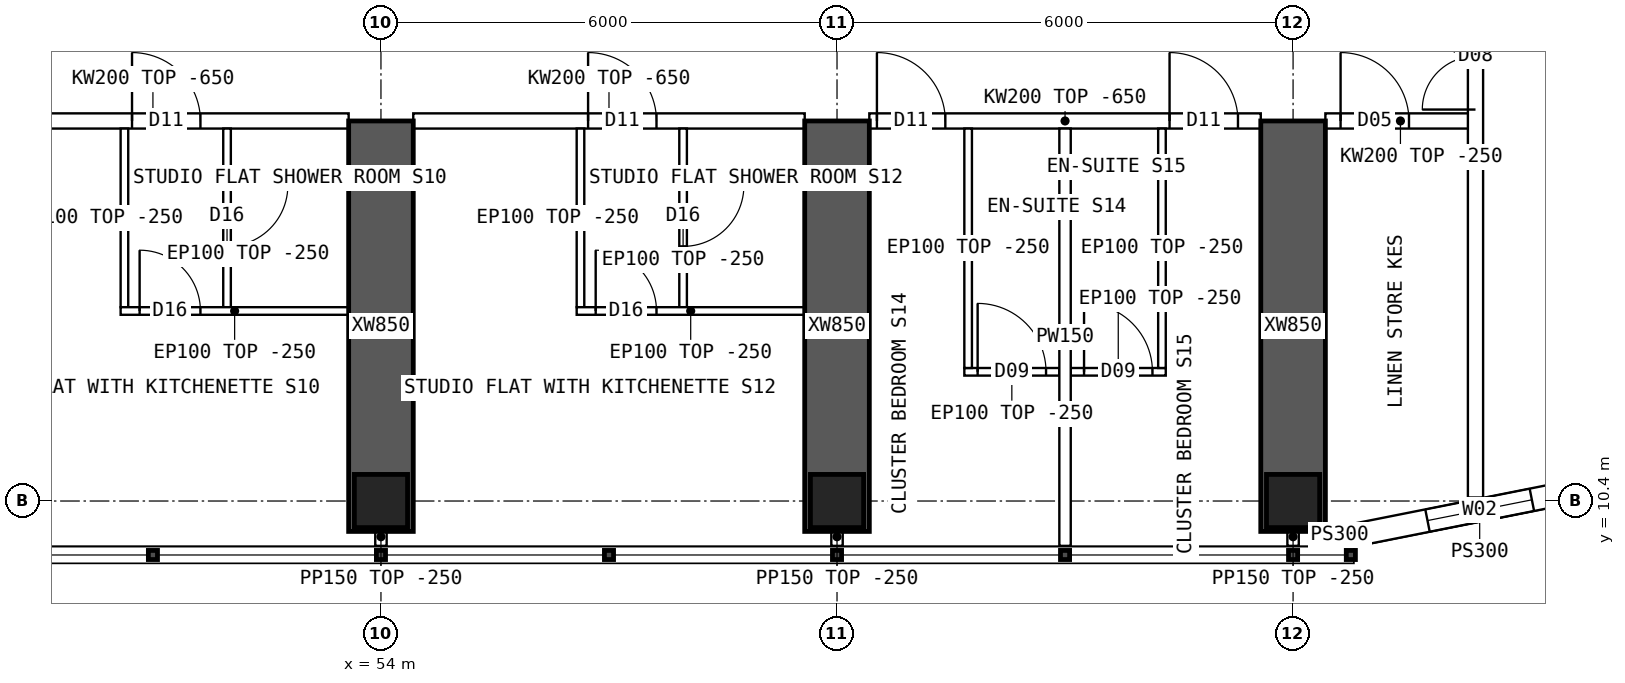
"""IFC4 building model, lengths in metres.
Left out: names, types, materials, properties, quantities, classifications, styles, units other than length and angle.
Written with IfcOpenShell. Run it as: python <this file> out.ifc"""

import sys

from ifc_helpers import new_model, si_unit, direction, frame, frame_2d, origin, origin_2d, place, context, subcontext, project, spatial, polyline, rectangle, hollow_rectangle, outline, extrude, element, fill, save


model = new_model("IFC4")
c1 = context("Model", 3, precision=1e-05, world=origin(), true_north=direction((0.0, 1.0)))
c2 = subcontext(c1, "Body", "Model", "MODEL_VIEW")
j1 = project(units=[si_unit("LENGTHUNIT", "METRE"), si_unit("PLANEANGLEUNIT", "RADIAN")], contexts=[c1])
p1 = place(None, origin())
s1 = spatial("IfcSite", under=j1, at=p1, CompositionType="ELEMENT")
p2 = place(p1, origin())
s2 = spatial("IfcBuilding", under=s1, at=p2, CompositionType="ELEMENT")
p3 = place(p2, frame((0.0, 0.0, 182.35)))
s3 = spatial("IfcBuildingStorey", under=s2, at=p3, CompositionType="ELEMENT", Elevation=182.35)
for number, where, z_axis, x_axis in (
    (1, (54.0, 10.4, 0.0), (0.0, 0.0, 1.0), (1.0, 0.0, 0.0)),
    (2, (60.0, 10.4, 0.0), (0.0, 0.0, 1.0), (1.0, 0.0, 0.0)),
    (3, (66.0, 10.4, 0.0), (0.0, 0.0, 1.0), (1.0, 0.0, 0.0)),
):
    element("IfcColumn", number, at=place(p3, frame(where, z_axis=z_axis, x_axis=x_axis)), inside=s3, PredefinedType="COLUMN", context=c2, shape_type="SweptSolid", body=[
        extrude(hollow_rectangle(XDim=0.7, YDim=0.7, WallThickness=0.07, at=origin_2d()), origin(), (0.0, 0.0, 1.0), 3.75),
    ])
for number, where, z_axis, x_axis in (
    (4, (54.0, 10.0, 0.0), (0.0, 0.0, 1.0), (0.0, 1.0, 0.0)),
    (5, (60.0, 10.0, 0.0), (0.0, 0.0, 1.0), (0.0, 1.0, 0.0)),
    (6, (66.0, 10.0, 0.0), (0.0, 0.0, 1.0), (0.0, 1.0, 0.0)),
):
    element("IfcWall", number, at=place(p3, frame(where, z_axis=z_axis, x_axis=x_axis)), inside=s3, PredefinedType="SHEAR", context=c2, shape_type="SweptSolid", body=[
        extrude(rectangle(XDim=5.4, YDim=0.85, at=frame_2d((2.7, 0.0))), origin(), (0.0, 0.0, 1.0), 3.75),
    ])
p4 = place(p3, frame((66.8, 9.95, 0.0), z_axis=(0.0, 0.0, 1.0), x_axis=(0.98078325777, 0.195100490205, 0.0)))
e7 = element("IfcWall", 7, at=p4, inside=s3, PredefinedType="SOLIDWALL", context=c2, shape_type="SweptSolid", body=[
    extrude(outline(polyline([(-0.03, -0.15), (3.405, -0.15), (3.345, 0.15), (0.03, 0.15), (-0.03, -0.15)])), origin(), (0.0, 0.0, 1.0), 3.5),
])
p5 = place(p4, frame((0.988, 0.0, 0.9)))
e8 = element("IfcOpeningElement", 8, at=p5, cuts=e7, PredefinedType="OPENING", context=c2, shape_type="SweptSolid", body=[
    extrude(rectangle(XDim=1.4, YDim=1.8, at=frame_2d((0.7, 0.9))), frame((0.0, 0.16, 0.0), z_axis=(0.0, -1.0, 0.0), x_axis=(1.0, 0.0, 0.0)), (0.0, 0.0, 1.0), 0.32),
])
p6 = place(p3, frame((66.8, 9.95, 0.0), z_axis=(0.0, 0.0, 1.0), x_axis=(-1.0, 0.0, 0.0)))
e9 = element("IfcWall", 9, at=p6, inside=s3, PredefinedType="SOLIDWALL", context=c2, shape_type="SweptSolid", body=[
    extrude(rectangle(XDim=0.375, YDim=0.3, at=frame_2d((0.188, 0.0))), origin(), (0.0, 0.0, 1.0), 3.5),
])
p7 = place(p3, frame((48.425, 15.4, 0.0), z_axis=(0.0, 0.0, 1.0), x_axis=(1.0, 0.0, 0.0)))
e10 = element("IfcWall", 10, at=p7, inside=s3, PredefinedType="SOLIDWALL", context=c2, shape_type="SweptSolid", body=[
    extrude(outline(polyline([(0.0, 0.0), (5.15, 0.0), (5.15, 3.1), (0.0, 3.1), (0.0, 0.0)])), frame((0.0, 0.1, 0.0), z_axis=(0.0, -1.0, 0.0), x_axis=(1.0, 0.0, 0.0)), (0.0, 0.0, 1.0), 0.2),
])
p8 = place(p7, frame((2.3, 0.0, 0.0)))
e11 = element("IfcOpeningElement", 11, at=p8, cuts=e10, PredefinedType="OPENING", context=c2, shape_type="SweptSolid", body=[
    extrude(rectangle(XDim=0.9, YDim=2.1, at=frame_2d((0.45, 1.05))), frame((0.0, 0.11, 0.0), z_axis=(0.0, -1.0, 0.0), x_axis=(1.0, 0.0, 0.0)), (0.0, 0.0, 1.0), 0.22),
])
p9 = place(p3, frame((54.425, 15.4, 0.0), z_axis=(0.0, 0.0, 1.0), x_axis=(1.0, 0.0, 0.0)))
e12 = element("IfcWall", 12, at=p9, inside=s3, PredefinedType="SOLIDWALL", context=c2, shape_type="SweptSolid", body=[
    extrude(outline(polyline([(0.0, 0.0), (5.15, 0.0), (5.15, 3.1), (0.0, 3.1), (0.0, 0.0)])), frame((0.0, 0.1, 0.0), z_axis=(0.0, -1.0, 0.0), x_axis=(1.0, 0.0, 0.0)), (0.0, 0.0, 1.0), 0.2),
])
p10 = place(p9, frame((2.3, 0.0, 0.0)))
e13 = element("IfcOpeningElement", 13, at=p10, cuts=e12, PredefinedType="OPENING", context=c2, shape_type="SweptSolid", body=[
    extrude(rectangle(XDim=0.9, YDim=2.1, at=frame_2d((0.45, 1.05))), frame((0.0, 0.11, 0.0), z_axis=(0.0, -1.0, 0.0), x_axis=(1.0, 0.0, 0.0)), (0.0, 0.0, 1.0), 0.22),
])
p11 = place(p3, frame((60.425, 15.4, 0.0), z_axis=(0.0, 0.0, 1.0), x_axis=(1.0, 0.0, 0.0)))
e14 = element("IfcWall", 14, at=p11, inside=s3, PredefinedType="SOLIDWALL", context=c2, shape_type="SweptSolid", body=[
    extrude(outline(polyline([(0.0, 0.0), (5.15, 0.0), (5.15, 3.1), (0.0, 3.1), (0.0, 0.0)])), frame((0.0, 0.1, 0.0), z_axis=(0.0, -1.0, 0.0), x_axis=(1.0, 0.0, 0.0)), (0.0, 0.0, 1.0), 0.2),
])
p12 = place(p11, frame((0.1, 0.0, 0.0)))
e15 = element("IfcOpeningElement", 15, at=p12, cuts=e14, PredefinedType="OPENING", context=c2, shape_type="SweptSolid", body=[
    extrude(rectangle(XDim=0.9, YDim=2.1, at=frame_2d((0.45, 1.05))), frame((0.0, 0.11, 0.0), z_axis=(0.0, -1.0, 0.0), x_axis=(1.0, 0.0, 0.0)), (0.0, 0.0, 1.0), 0.22),
])
p13 = place(p11, frame((3.95, 0.0, 0.0)))
e16 = element("IfcOpeningElement", 16, at=p13, cuts=e14, PredefinedType="OPENING", context=c2, shape_type="SweptSolid", body=[
    extrude(rectangle(XDim=0.9, YDim=2.1, at=frame_2d((0.45, 1.05))), frame((0.0, 0.11, 0.0), z_axis=(0.0, -1.0, 0.0), x_axis=(1.0, 0.0, 0.0)), (0.0, 0.0, 1.0), 0.22),
])
p14 = place(p3, frame((66.425, 15.4, 0.0), z_axis=(0.0, 0.0, 1.0), x_axis=(1.0, 0.0, 0.0)))
e17 = element("IfcWall", 17, at=p14, inside=s3, PredefinedType="SOLIDWALL", context=c2, shape_type="SweptSolid", body=[
    extrude(rectangle(XDim=1.975, YDim=0.2, at=frame_2d((0.987, 0.0))), origin(), (0.0, 0.0, 1.0), 3.5),
])
p15 = place(p14, frame((0.2, 0.0, 0.0)))
e18 = element("IfcOpeningElement", 18, at=p15, cuts=e17, PredefinedType="OPENING", context=c2, shape_type="SweptSolid", body=[
    extrude(rectangle(XDim=0.9, YDim=2.1, at=frame_2d((0.45, 1.05))), frame((0.0, 0.11, 0.0), z_axis=(0.0, -1.0, 0.0), x_axis=(1.0, 0.0, 0.0)), (0.0, 0.0, 1.0), 0.22),
])
p16 = place(p3, frame((53.575, 12.9, 0.0), z_axis=(0.0, 0.0, 1.0), x_axis=(-1.0, 0.0, 0.0)))
e19 = element("IfcWall", 19, at=p16, inside=s3, PredefinedType="PARTITIONING", context=c2, shape_type="SweptSolid", body=[
    extrude(rectangle(XDim=3.0, YDim=0.1, at=frame_2d((1.5, 0.0))), origin(), (0.0, 0.0, 1.0), 3.5),
])
p17 = place(p16, frame((1.95, 0.0, 0.0)))
e20 = element("IfcOpeningElement", 20, at=p17, cuts=e19, PredefinedType="OPENING", context=c2, shape_type="SweptSolid", body=[
    extrude(rectangle(XDim=0.8, YDim=2.1, at=frame_2d((0.4, 1.05))), frame((0.0, 0.06, 0.0), z_axis=(0.0, -1.0, 0.0), x_axis=(1.0, 0.0, 0.0)), (0.0, 0.0, 1.0), 0.12),
])
p18 = place(p3, frame((50.625, 12.95, 0.0), z_axis=(0.0, 0.0, 1.0), x_axis=(0.0, 1.0, 0.0)))
e21 = element("IfcWall", 21, at=p18, inside=s3, PredefinedType="PARTITIONING", context=c2, shape_type="SweptSolid", body=[
    extrude(outline(polyline([(0.0, 0.0), (2.35, 0.0), (2.35, 3.1), (2.302, 3.1), (2.3, 3.5), (0.0, 3.5), (0.0, 0.0)])), frame((0.0, 0.05, 0.0), z_axis=(0.0, -1.0, 0.0), x_axis=(1.0, 0.0, 0.0)), (0.0, 0.0, 1.0), 0.1),
])
p19 = place(p3, frame((51.975, 12.95, 0.0), z_axis=(0.0, 0.0, 1.0), x_axis=(0.0, 1.0, 0.0)))
e22 = element("IfcWall", 22, at=p19, inside=s3, PredefinedType="PARTITIONING", context=c2, shape_type="SweptSolid", body=[
    extrude(outline(polyline([(0.0, 0.0), (2.35, 0.0), (2.35, 3.1), (2.302, 3.1), (2.3, 3.5), (0.0, 3.5), (0.0, 0.0)])), frame((0.0, 0.05, 0.0), z_axis=(0.0, -1.0, 0.0), x_axis=(1.0, 0.0, 0.0)), (0.0, 0.0, 1.0), 0.1),
])
p20 = place(p19, frame((0.8, 0.0, 0.0)))
e23 = element("IfcOpeningElement", 23, at=p20, cuts=e22, PredefinedType="OPENING", context=c2, shape_type="SweptSolid", body=[
    extrude(rectangle(XDim=0.8, YDim=2.1, at=frame_2d((0.4, 1.05))), frame((0.0, 0.06, 0.0), z_axis=(0.0, -1.0, 0.0), x_axis=(1.0, 0.0, 0.0)), (0.0, 0.0, 1.0), 0.12),
])
p21 = place(p3, frame((59.575, 12.9, 0.0), z_axis=(0.0, 0.0, 1.0), x_axis=(-1.0, 0.0, 0.0)))
e24 = element("IfcWall", 24, at=p21, inside=s3, PredefinedType="PARTITIONING", context=c2, shape_type="SweptSolid", body=[
    extrude(rectangle(XDim=3.0, YDim=0.1, at=frame_2d((1.5, 0.0))), origin(), (0.0, 0.0, 1.0), 3.5),
])
p22 = place(p21, frame((1.95, 0.0, 0.0)))
e25 = element("IfcOpeningElement", 25, at=p22, cuts=e24, PredefinedType="OPENING", context=c2, shape_type="SweptSolid", body=[
    extrude(rectangle(XDim=0.8, YDim=2.1, at=frame_2d((0.4, 1.05))), frame((0.0, 0.06, 0.0), z_axis=(0.0, -1.0, 0.0), x_axis=(1.0, 0.0, 0.0)), (0.0, 0.0, 1.0), 0.12),
])
p23 = place(p3, frame((56.625, 12.95, 0.0), z_axis=(0.0, 0.0, 1.0), x_axis=(0.0, 1.0, 0.0)))
e26 = element("IfcWall", 26, at=p23, inside=s3, PredefinedType="PARTITIONING", context=c2, shape_type="SweptSolid", body=[
    extrude(outline(polyline([(0.0, 0.0), (2.35, 0.0), (2.35, 3.1), (2.302, 3.1), (2.3, 3.5), (0.0, 3.5), (0.0, 0.0)])), frame((0.0, 0.05, 0.0), z_axis=(0.0, -1.0, 0.0), x_axis=(1.0, 0.0, 0.0)), (0.0, 0.0, 1.0), 0.1),
])
p24 = place(p3, frame((57.975, 12.95, 0.0), z_axis=(0.0, 0.0, 1.0), x_axis=(0.0, 1.0, 0.0)))
e27 = element("IfcWall", 27, at=p24, inside=s3, PredefinedType="PARTITIONING", context=c2, shape_type="SweptSolid", body=[
    extrude(outline(polyline([(0.0, 0.0), (2.35, 0.0), (2.35, 3.1), (2.302, 3.1), (2.3, 3.5), (0.0, 3.5), (0.0, 0.0)])), frame((0.0, 0.05, 0.0), z_axis=(0.0, -1.0, 0.0), x_axis=(1.0, 0.0, 0.0)), (0.0, 0.0, 1.0), 0.1),
])
p25 = place(p24, frame((0.8, 0.0, 0.0)))
e28 = element("IfcOpeningElement", 28, at=p25, cuts=e27, PredefinedType="OPENING", context=c2, shape_type="SweptSolid", body=[
    extrude(rectangle(XDim=0.8, YDim=2.1, at=frame_2d((0.4, 1.05))), frame((0.0, 0.06, 0.0), z_axis=(0.0, -1.0, 0.0), x_axis=(1.0, 0.0, 0.0)), (0.0, 0.0, 1.0), 0.12),
])
p26 = place(p3, frame((63.0, 9.81, 0.0), z_axis=(0.0, 0.0, 1.0), x_axis=(0.0, 1.0, 0.0)))
e29 = element("IfcWall", 29, at=p26, inside=s3, PredefinedType="PARTITIONING", context=c2, shape_type="SweptSolid", body=[
    extrude(outline(polyline([(0.0, 0.0), (5.49, 0.0), (5.49, 3.1), (5.442, 3.1), (5.44, 3.5), (0.792, 3.5), (0.79, 3.1), (0.392, 3.1), (0.39, 3.5), (0.0, 3.5), (0.0, 0.0)])), frame((0.0, 0.075, 0.0), z_axis=(0.0, -1.0, 0.0), x_axis=(1.0, 0.0, 0.0)), (0.0, 0.0, 1.0), 0.15),
])
p27 = place(p3, frame((62.925, 12.1, 0.0), z_axis=(0.0, 0.0, 1.0), x_axis=(-1.0, 0.0, 0.0)))
e30 = element("IfcWall", 30, at=p27, inside=s3, PredefinedType="PARTITIONING", context=c2, shape_type="SweptSolid", body=[
    extrude(rectangle(XDim=1.25, YDim=0.1, at=frame_2d((0.625, 0.0))), origin(), (0.0, 0.0, 1.0), 3.5),
])
p28 = place(p27, frame((0.175, 0.0, 0.0)))
e31 = element("IfcOpeningElement", 31, at=p28, cuts=e30, PredefinedType="OPENING", context=c2, shape_type="SweptSolid", body=[
    extrude(rectangle(XDim=0.9, YDim=2.1, at=frame_2d((0.45, 1.05))), frame((0.0, 0.06, 0.0), z_axis=(0.0, -1.0, 0.0), x_axis=(1.0, 0.0, 0.0)), (0.0, 0.0, 1.0), 0.12),
])
p29 = place(p3, frame((61.725, 12.15, 0.0), z_axis=(0.0, 0.0, 1.0), x_axis=(0.0, 1.0, 0.0)))
e32 = element("IfcWall", 32, at=p29, inside=s3, PredefinedType="PARTITIONING", context=c2, shape_type="SweptSolid", body=[
    extrude(outline(polyline([(0.0, 0.0), (3.15, 0.0), (3.15, 3.1), (3.102, 3.1), (3.1, 3.5), (0.0, 3.5), (0.0, 0.0)])), frame((0.0, 0.05, 0.0), z_axis=(0.0, -1.0, 0.0), x_axis=(1.0, 0.0, 0.0)), (0.0, 0.0, 1.0), 0.1),
])
p30 = place(p3, frame((64.325, 12.1, 0.0), z_axis=(0.0, 0.0, 1.0), x_axis=(-1.0, 0.0, 0.0)))
e33 = element("IfcWall", 33, at=p30, inside=s3, PredefinedType="PARTITIONING", context=c2, shape_type="SweptSolid", body=[
    extrude(rectangle(XDim=1.25, YDim=0.1, at=frame_2d((0.625, 0.0))), origin(), (0.0, 0.0, 1.0), 3.5),
])
p31 = place(p30, frame((0.175, 0.0, 0.0)))
e34 = element("IfcOpeningElement", 34, at=p31, cuts=e33, PredefinedType="OPENING", context=c2, shape_type="SweptSolid", body=[
    extrude(rectangle(XDim=0.9, YDim=2.1, at=frame_2d((0.45, 1.05))), frame((0.0, 0.06, 0.0), z_axis=(0.0, -1.0, 0.0), x_axis=(1.0, 0.0, 0.0)), (0.0, 0.0, 1.0), 0.12),
])
p32 = place(p3, frame((64.275, 12.15, 0.0), z_axis=(0.0, 0.0, 1.0), x_axis=(0.0, 1.0, 0.0)))
e35 = element("IfcWall", 35, at=p32, inside=s3, PredefinedType="PARTITIONING", context=c2, shape_type="SweptSolid", body=[
    extrude(outline(polyline([(0.0, 0.0), (3.15, 0.0), (3.15, 3.1), (3.102, 3.1), (3.1, 3.5), (0.0, 3.5), (0.0, 0.0)])), frame((0.0, 0.05, 0.0), z_axis=(0.0, -1.0, 0.0), x_axis=(1.0, 0.0, 0.0)), (0.0, 0.0, 1.0), 0.1),
])
p33 = place(p3, frame((68.4, 10.446, 0.0), z_axis=(0.0, 0.0, 1.0), x_axis=(0.0, 1.0, 0.0)))
e36 = element("IfcWall", 36, at=p33, inside=s3, PredefinedType="SOLIDWALL", context=c2, shape_type="SweptSolid", body=[
    extrude(rectangle(XDim=43.107, YDim=0.2, at=frame_2d((21.554, 0.0))), origin(), (0.0, 0.0, 1.0), 3.5),
])
p34 = place(p33, frame((5.104, 0.0, 0.0)))
e37 = element("IfcOpeningElement", 37, at=p34, cuts=e36, PredefinedType="OPENING", context=c2, shape_type="SweptSolid", body=[
    extrude(rectangle(XDim=1.4, YDim=2.1, at=frame_2d((0.7, 1.05))), frame((0.0, 0.11, 0.0), z_axis=(0.0, -1.0, 0.0), x_axis=(1.0, 0.0, 0.0)), (0.0, 0.0, 1.0), 0.22),
])
p35 = place(p33, frame((36.504, 0.0, 0.0)))
e38 = element("IfcOpeningElement", 38, at=p35, cuts=e36, PredefinedType="OPENING", context=c2, shape_type="SweptSolid", body=[
    extrude(rectangle(XDim=1.4, YDim=2.1, at=frame_2d((0.7, 1.05))), frame((0.0, 0.11, 0.0), z_axis=(0.0, -1.0, 0.0), x_axis=(1.0, 0.0, 0.0)), (0.0, 0.0, 1.0), 0.22),
])
for number, where, z_axis, x_axis in (
    (39, (54.0, 10.05, 0.0), (0.0, 0.0, 1.0), (0.0, -1.0, 0.0)),
    (40, (60.0, 10.05, 0.0), (0.0, 0.0, 1.0), (0.0, -1.0, 0.0)),
    (41, (66.0, 10.05, 0.0), (0.0, 0.0, 1.0), (0.0, -1.0, 0.0)),
):
    element("IfcWall", number, at=place(p3, frame(where, z_axis=z_axis, x_axis=x_axis)), inside=s3, PredefinedType="PARTITIONING", context=c2, shape_type="SweptSolid", body=[
        extrude(rectangle(XDim=0.24, YDim=0.15, at=frame_2d((0.12, 0.0))), origin(), (0.0, 0.0, 1.0), 3.5),
    ])
p36 = place(p5, origin())
e42 = element("IfcWindow", 42, at=p36, inside=s3, PartitioningType="SINGLE_PANEL", PredefinedType="WINDOW", context=c2, shape_type="SweptSolid", body=[
    extrude(rectangle(XDim=1.4, YDim=1.8, at=frame_2d((0.7, 0.9))), frame((0.0, 0.03, 0.0), z_axis=(0.0, -1.0, 0.0), x_axis=(1.0, 0.0, 0.0)), (0.0, 0.0, 1.0), 0.06),
])
fill(e8, e42)
p37 = place(p17, origin())
e43 = element("IfcDoor", 43, at=p37, inside=s3, OperationType="SINGLE_SWING_RIGHT", PredefinedType="DOOR", context=c2, shape_type="SweptSolid", body=[
    extrude(rectangle(XDim=0.8, YDim=2.1, at=frame_2d((0.4, 1.05))), frame((0.0, 0.025, 0.0), z_axis=(0.0, -1.0, 0.0), x_axis=(1.0, 0.0, 0.0)), (0.0, 0.0, 1.0), 0.05),
])
fill(e20, e43)
p38 = place(p20, origin())
e44 = element("IfcDoor", 44, at=p38, inside=s3, OperationType="SINGLE_SWING_RIGHT", PredefinedType="DOOR", context=c2, shape_type="SweptSolid", body=[
    extrude(rectangle(XDim=0.8, YDim=2.1, at=frame_2d((0.4, 1.05))), frame((0.0, 0.025, 0.0), z_axis=(0.0, -1.0, 0.0), x_axis=(1.0, 0.0, 0.0)), (0.0, 0.0, 1.0), 0.05),
])
fill(e23, e44)
p39 = place(p8, origin())
e45 = element("IfcDoor", 45, at=p39, inside=s3, OperationType="SINGLE_SWING_LEFT", PredefinedType="DOOR", context=c2, shape_type="SweptSolid", body=[
    extrude(rectangle(XDim=0.9, YDim=2.1, at=frame_2d((0.45, 1.05))), frame((0.0, 0.025, 0.0), z_axis=(0.0, -1.0, 0.0), x_axis=(1.0, 0.0, 0.0)), (0.0, 0.0, 1.0), 0.05),
])
fill(e11, e45)
p40 = place(p22, origin())
e46 = element("IfcDoor", 46, at=p40, inside=s3, OperationType="SINGLE_SWING_RIGHT", PredefinedType="DOOR", context=c2, shape_type="SweptSolid", body=[
    extrude(rectangle(XDim=0.8, YDim=2.1, at=frame_2d((0.4, 1.05))), frame((0.0, 0.025, 0.0), z_axis=(0.0, -1.0, 0.0), x_axis=(1.0, 0.0, 0.0)), (0.0, 0.0, 1.0), 0.05),
])
fill(e25, e46)
p41 = place(p25, origin())
e47 = element("IfcDoor", 47, at=p41, inside=s3, OperationType="SINGLE_SWING_RIGHT", PredefinedType="DOOR", context=c2, shape_type="SweptSolid", body=[
    extrude(rectangle(XDim=0.8, YDim=2.1, at=frame_2d((0.4, 1.05))), frame((0.0, 0.025, 0.0), z_axis=(0.0, -1.0, 0.0), x_axis=(1.0, 0.0, 0.0)), (0.0, 0.0, 1.0), 0.05),
])
fill(e28, e47)
p42 = place(p10, origin())
e48 = element("IfcDoor", 48, at=p42, inside=s3, OperationType="SINGLE_SWING_LEFT", PredefinedType="DOOR", context=c2, shape_type="SweptSolid", body=[
    extrude(rectangle(XDim=0.9, YDim=2.1, at=frame_2d((0.45, 1.05))), frame((0.0, 0.025, 0.0), z_axis=(0.0, -1.0, 0.0), x_axis=(1.0, 0.0, 0.0)), (0.0, 0.0, 1.0), 0.05),
])
fill(e13, e48)
p43 = place(p28, origin())
e49 = element("IfcDoor", 49, at=p43, inside=s3, OperationType="SINGLE_SWING_RIGHT", PredefinedType="DOOR", context=c2, shape_type="SweptSolid", body=[
    extrude(rectangle(XDim=0.9, YDim=2.1, at=frame_2d((0.45, 1.05))), frame((0.0, 0.025, 0.0), z_axis=(0.0, -1.0, 0.0), x_axis=(1.0, 0.0, 0.0)), (0.0, 0.0, 1.0), 0.05),
])
fill(e31, e49)
p44 = place(p12, origin())
e50 = element("IfcDoor", 50, at=p44, inside=s3, OperationType="SINGLE_SWING_LEFT", PredefinedType="DOOR", context=c2, shape_type="SweptSolid", body=[
    extrude(rectangle(XDim=0.9, YDim=2.1, at=frame_2d((0.45, 1.05))), frame((0.0, 0.025, 0.0), z_axis=(0.0, -1.0, 0.0), x_axis=(1.0, 0.0, 0.0)), (0.0, 0.0, 1.0), 0.05),
])
fill(e15, e50)
p45 = place(p31, origin())
e51 = element("IfcDoor", 51, at=p45, inside=s3, OperationType="SINGLE_SWING_RIGHT", PredefinedType="DOOR", context=c2, shape_type="SweptSolid", body=[
    extrude(rectangle(XDim=0.9, YDim=2.1, at=frame_2d((0.45, 1.05))), frame((0.0, 0.025, 0.0), z_axis=(0.0, -1.0, 0.0), x_axis=(1.0, 0.0, 0.0)), (0.0, 0.0, 1.0), 0.05),
])
fill(e34, e51)
p46 = place(p13, origin())
e52 = element("IfcDoor", 52, at=p46, inside=s3, OperationType="SINGLE_SWING_LEFT", PredefinedType="DOOR", context=c2, shape_type="SweptSolid", body=[
    extrude(rectangle(XDim=0.9, YDim=2.1, at=frame_2d((0.45, 1.05))), frame((0.0, 0.025, 0.0), z_axis=(0.0, -1.0, 0.0), x_axis=(1.0, 0.0, 0.0)), (0.0, 0.0, 1.0), 0.05),
])
fill(e16, e52)
p47 = place(p34, origin())
e53 = element("IfcDoor", 53, at=p47, inside=s3, OperationType="DOUBLE_DOOR_SINGLE_SWING", PredefinedType="DOOR", context=c2, shape_type="SweptSolid", body=[
    extrude(rectangle(XDim=1.4, YDim=2.1, at=frame_2d((0.7, 1.05))), frame((0.0, 0.025, 0.0), z_axis=(0.0, -1.0, 0.0), x_axis=(1.0, 0.0, 0.0)), (0.0, 0.0, 1.0), 0.05),
])
fill(e37, e53)
p48 = place(p15, origin())
e54 = element("IfcDoor", 54, at=p48, inside=s3, OperationType="SINGLE_SWING_LEFT", PredefinedType="DOOR", context=c2, shape_type="SweptSolid", body=[
    extrude(rectangle(XDim=0.9, YDim=2.1, at=frame_2d((0.45, 1.05))), frame((0.0, 0.025, 0.0), z_axis=(0.0, -1.0, 0.0), x_axis=(1.0, 0.0, 0.0)), (0.0, 0.0, 1.0), 0.05),
])
fill(e18, e54)
save(model, sys.argv[1])
